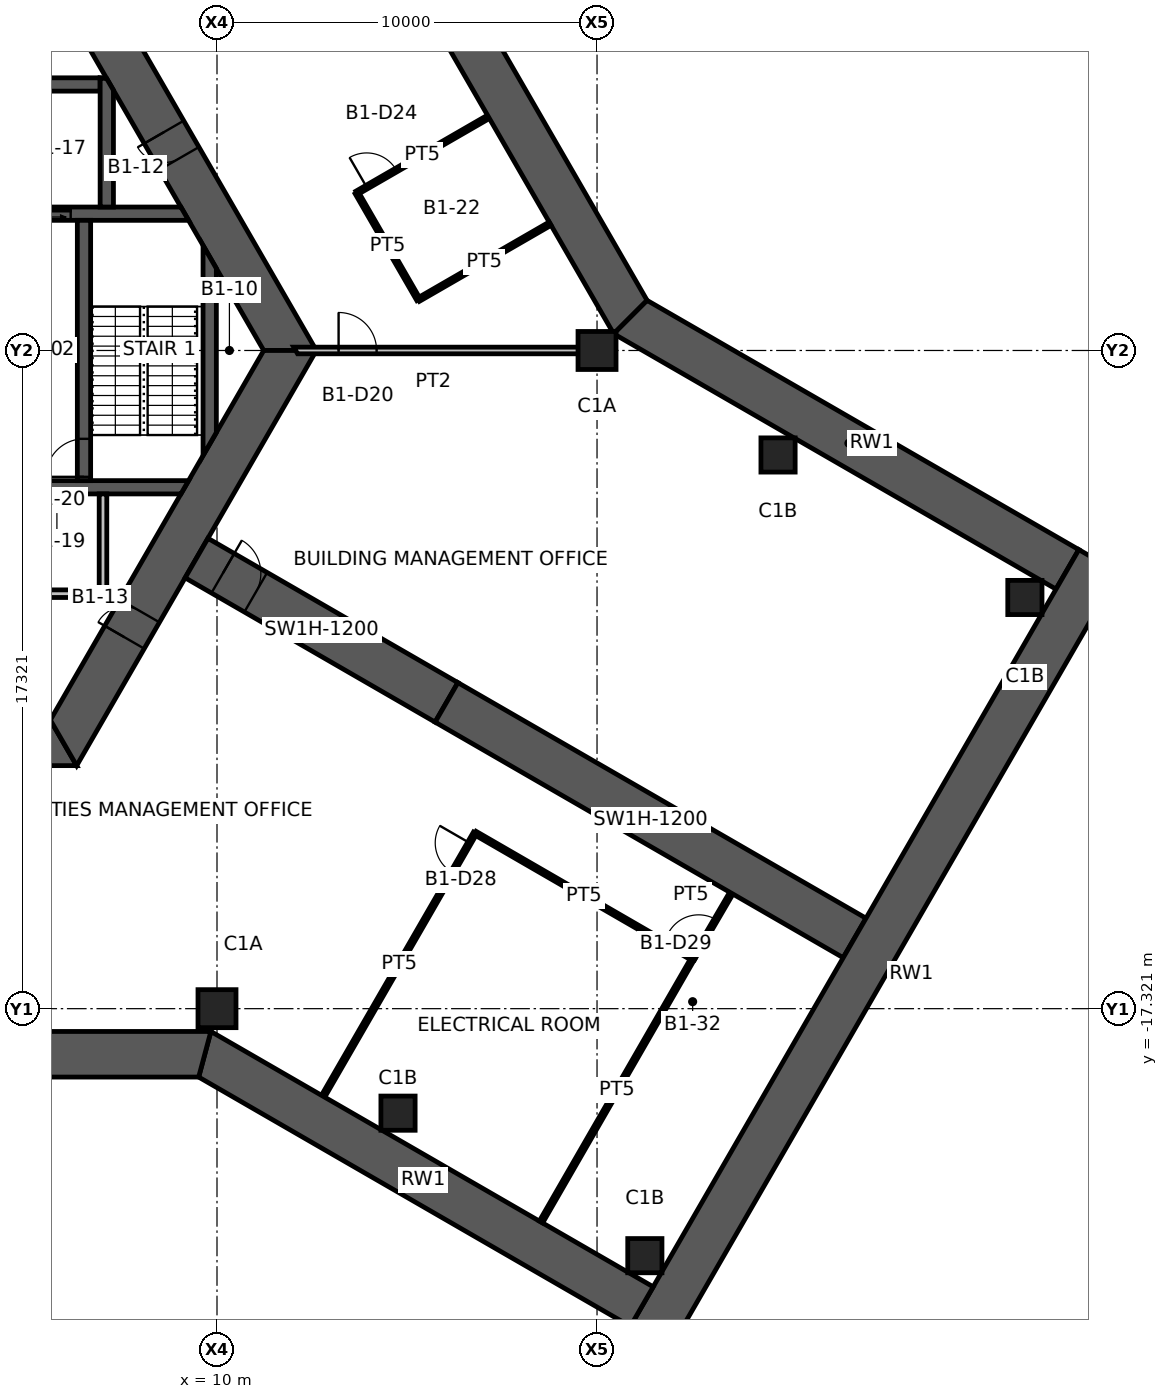
"""IFC4 building model, lengths in metres.
Left out: names, types, materials, properties, quantities, classifications, styles, units other than length and angle.
Written with IfcOpenShell. Run it as: python <this file> out.ifc"""

import sys

from ifc_helpers import new_model, si_unit, direction, frame, frame_2d, origin, origin_2d, place, context, subcontext, project, spatial, polyline, rectangle, hollow_rectangle, outline, extrude, element, fill, save


model = new_model("IFC4")
c1 = context("Model", 3, precision=1e-05, world=origin(), true_north=direction((0.0, 1.0)))
c2 = subcontext(c1, "Body", "Model", "MODEL_VIEW")
j1 = project(units=[si_unit("LENGTHUNIT", "METRE"), si_unit("PLANEANGLEUNIT", "RADIAN")], contexts=[c1])
p1 = place(None, origin())
s1 = spatial("IfcSite", under=j1, at=p1, CompositionType="ELEMENT")
p2 = place(p1, origin())
s2 = spatial("IfcBuilding", under=s1, at=p2, CompositionType="ELEMENT")
p3 = place(p2, frame((0.0, 0.0, -5.0)))
s3 = spatial("IfcBuildingStorey", under=s2, at=p3, CompositionType="ELEMENT", Elevation=-5.0)
for number, where, z_axis, x_axis in (
    (1, (20.0, 0.0, 0.0), (0.0, 0.0, 1.0), (1.0, 0.0, 0.0)),
    (2, (10.0, -17.321, 0.0), (0.0, 0.0, 1.0), (1.0, 0.0, 0.0)),
):
    element("IfcColumn", number, at=place(p3, frame(where, z_axis=z_axis, x_axis=x_axis)), inside=s3, PredefinedType="COLUMN", context=c2, shape_type="SweptSolid", body=[
        extrude(hollow_rectangle(XDim=1.0, YDim=1.0, WallThickness=0.06, at=origin_2d()), origin(), (0.0, 0.0, 1.0), 5.0),
    ])
for number, where, z_axis, x_axis in (
    (3, (14.763, -20.071, 0.0), (0.0, 0.0, 1.0), (1.0, 0.0, 0.0)),
    (4, (21.258, -23.821, 0.0), (0.0, 0.0, 1.0), (1.0, 0.0, 0.0)),
    (5, (24.763, -2.75, 0.0), (0.0, 0.0, 1.0), (1.0, 0.0, 0.0)),
    (6, (31.258, -6.5, 0.0), (0.0, 0.0, 1.0), (1.0, 0.0, 0.0)),
):
    element("IfcColumn", number, at=place(p3, frame(where, z_axis=z_axis, x_axis=x_axis)), inside=s3, PredefinedType="COLUMN", context=c2, shape_type="SweptSolid", body=[
        extrude(hollow_rectangle(XDim=0.9, YDim=0.9, WallThickness=0.05, at=origin_2d()), origin(), (0.0, 0.0, 1.0), 5.0),
    ])
p4 = place(p3, frame((11.922, 0.0, 0.0), z_axis=(0.0, 0.0, 1.0), x_axis=(-0.500004296715, 0.866022923061, 0.0)))
e7 = element("IfcWall", 7, at=p4, inside=s3, PredefinedType="SHEAR", context=c2, shape_type="SweptSolid", body=[
    extrude(outline(polyline([(-0.346, -0.6), (5.835, -0.6), (6.635, -0.6), (12.269, -0.6), (11.576, 0.6), (6.635, 0.6), (5.835, 0.6), (0.346, 0.6), (-0.346, -0.6)])), origin(), (0.0, 0.0, 1.0), 5.0),
])
p5 = place(p4, frame((5.835, 0.0, 0.0)))
e8 = element("IfcOpeningElement", 8, at=p5, cuts=e7, PredefinedType="OPENING", context=c2, shape_type="SweptSolid", body=[
    extrude(rectangle(XDim=0.8, YDim=2.1, at=frame_2d((0.4, 1.05))), frame((0.0, 0.61, 0.0), z_axis=(0.0, -1.0, 0.0), x_axis=(1.0, 0.0, 0.0)), (0.0, 0.0, 1.0), 1.22),
])
p6 = place(p3, frame((-5.961, -10.325, 0.0), z_axis=(0.0, 0.0, 1.0), x_axis=(1.0, 0.0, 0.0)))
e9 = element("IfcWall", 9, at=p6, inside=s3, PredefinedType="SHEAR", context=c2, shape_type="SweptSolid", body=[
    extrude(outline(polyline([(-0.346, -0.6), (5.461, -0.6), (6.461, -0.6), (12.269, -0.6), (11.576, 0.6), (6.461, 0.6), (5.461, 0.6), (0.346, 0.6), (-0.346, -0.6)])), origin(), (0.0, 0.0, 1.0), 5.0),
])
p7 = place(p6, frame((5.461, 0.0, 0.0)))
e10 = element("IfcOpeningElement", 10, at=p7, cuts=e9, PredefinedType="OPENING", context=c2, shape_type="SweptSolid", body=[
    extrude(rectangle(XDim=1.0, YDim=2.1, at=frame_2d((0.5, 1.05))), frame((0.0, 0.61, 0.0), z_axis=(0.0, -1.0, 0.0), x_axis=(1.0, 0.0, 0.0)), (0.0, 0.0, 1.0), 1.22),
])
p8 = place(p3, frame((5.961, -10.325, 0.0), z_axis=(0.0, 0.0, 1.0), x_axis=(0.500004296715, 0.866022923061, 0.0)))
e11 = element("IfcWall", 11, at=p8, inside=s3, PredefinedType="SHEAR", context=c2, shape_type="SweptSolid", body=[
    extrude(outline(polyline([(-0.346, -0.6), (3.208, -0.6), (4.009, -0.6), (12.269, -0.6), (11.576, 0.6), (4.009, 0.6), (3.208, 0.6), (0.346, 0.6), (-0.346, -0.6)])), origin(), (0.0, 0.0, 1.0), 5.0),
])
p9 = place(p8, frame((3.208, 0.0, 0.0)))
e12 = element("IfcOpeningElement", 12, at=p9, cuts=e11, PredefinedType="OPENING", context=c2, shape_type="SweptSolid", body=[
    extrude(rectangle(XDim=0.8, YDim=2.1, at=frame_2d((0.4, 1.05))), frame((0.0, 0.61, 0.0), z_axis=(0.0, -1.0, 0.0), x_axis=(1.0, 0.0, 0.0)), (0.0, 0.0, 1.0), 1.22),
])
p10 = place(p3, frame((9.461, -5.462, 0.0), z_axis=(0.0, 0.0, 1.0), x_axis=(0.866019116917, -0.500010889016, 0.0)))
e13 = element("IfcWall", 13, at=p10, inside=s3, PredefinedType="SHEAR", context=c2, shape_type="SweptSolid", body=[
    extrude(rectangle(XDim=7.595, YDim=1.2, at=frame_2d((3.798, 0.0))), origin(), (0.0, 0.0, 1.0), 5.0),
])
p11 = place(p10, frame((0.8, 0.0, 0.0)))
e14 = element("IfcOpeningElement", 14, at=p11, cuts=e13, PredefinedType="OPENING", context=c2, shape_type="SweptSolid", body=[
    extrude(rectangle(XDim=1.0, YDim=2.1, at=frame_2d((0.5, 1.05))), frame((0.0, 0.61, 0.0), z_axis=(0.0, -1.0, 0.0), x_axis=(1.0, 0.0, 0.0)), (0.0, 0.0, 1.0), 1.22),
])
p12 = place(p3, frame((16.039, -9.26, 0.0), z_axis=(0.0, 0.0, 1.0), x_axis=(0.866023285932, -0.50000366821, 0.0)))
e15 = element("IfcWall", 15, at=p12, inside=s3, PredefinedType="SHEAR", context=c2, shape_type="SweptSolid", body=[
    extrude(rectangle(XDim=12.4, YDim=1.2, at=frame_2d((6.2, 0.0))), origin(), (0.0, 0.0, 1.0), 5.0),
])
p13 = place(p3, frame((11.2, 17.642, 0.0), z_axis=(0.0, 0.0, 1.0), x_axis=(0.499998307868, -0.866026380735, 0.0)))
e16 = element("IfcWall", 16, at=p13, inside=s3, PredefinedType="SOLIDWALL", context=c2, shape_type="SweptSolid", body=[
    extrude(outline(polyline([(-0.161, -0.6), (19.518, -0.6), (19.196, 0.6), (0.161, 0.6), (-0.161, -0.6)])), origin(), (0.0, 0.0, 1.0), 5.0),
])
p14 = place(p3, frame((20.878, 0.878, 0.0), z_axis=(0.0, 0.0, 1.0), x_axis=(0.866028209229, -0.499995140796, 0.0)))
e17 = element("IfcWall", 17, at=p14, inside=s3, PredefinedType="SOLIDWALL", context=c2, shape_type="SweptSolid", body=[
    extrude(outline(polyline([(-0.161, -0.6), (13.279, -0.6), (13.279, 0.6), (0.161, 0.6), (-0.161, -0.6)])), origin(), (0.0, 0.0, 1.0), 5.0),
])
p15 = place(p3, frame((33.198, -5.541, 0.0), z_axis=(0.0, 0.0, 1.0), x_axis=(-0.500005427746, -0.866022270051, 0.0)))
e18 = element("IfcWall", 18, at=p15, inside=s3, PredefinedType="SOLIDWALL", context=c2, shape_type="SweptSolid", body=[
    extrude(rectangle(XDim=23.6, YDim=1.2, at=frame_2d((11.8, 0.0))), origin(), (0.0, 0.0, 1.0), 5.0),
])
p16 = place(p3, frame((21.178, -25.16, 0.0), z_axis=(0.0, 0.0, 1.0), x_axis=(-0.866028209229, 0.499995140796, 0.0)))
e19 = element("IfcWall", 19, at=p16, inside=s3, PredefinedType="SOLIDWALL", context=c2, shape_type="SweptSolid", body=[
    extrude(outline(polyline([(0.0, -0.6), (13.439, -0.6), (13.118, 0.6), (0.0, 0.6), (0.0, -0.6)])), origin(), (0.0, 0.0, 1.0), 5.0),
])
p17 = place(p3, frame((9.678, -18.521, 0.0), z_axis=(0.0, 0.0, 1.0), x_axis=(-1.0, 0.0, 0.0)))
e20 = element("IfcWall", 20, at=p17, inside=s3, PredefinedType="SOLIDWALL", context=c2, shape_type="SweptSolid", body=[
    extrude(outline(polyline([(-0.161, -0.6), (19.518, -0.6), (19.196, 0.6), (0.161, 0.6), (-0.161, -0.6)])), origin(), (0.0, 0.0, 1.0), 5.0),
])
p18 = place(p3, frame((1.425, 3.6, 0.0), z_axis=(0.0, 0.0, 1.0), x_axis=(1.0, 0.0, 0.0)))
e21 = element("IfcWall", 21, at=p18, inside=s3, PredefinedType="SHEAR", context=c2, shape_type="SweptSolid", body=[
    extrude(outline(polyline([(0.0, -0.175), (3.425, -0.175), (4.725, -0.175), (7.827, -0.175), (7.625, 0.175), (4.725, 0.175), (3.425, 0.175), (0.0, 0.175), (0.0, -0.175)])), origin(), (0.0, 0.0, 1.0), 5.0),
])
p19 = place(p18, frame((3.425, 0.0, 0.0)))
e22 = element("IfcOpeningElement", 22, at=p19, cuts=e21, PredefinedType="OPENING", context=c2, shape_type="SweptSolid", body=[
    extrude(rectangle(XDim=1.3, YDim=2.1, at=frame_2d((0.65, 1.05))), frame((0.0, 0.185, 0.0), z_axis=(0.0, -1.0, 0.0), x_axis=(1.0, 0.0, 0.0)), (0.0, 0.0, 1.0), 0.37),
])
p20 = place(p3, frame((1.425, -3.6, 0.0), z_axis=(0.0, 0.0, 1.0), x_axis=(1.0, 0.0, 0.0)))
e23 = element("IfcWall", 23, at=p20, inside=s3, PredefinedType="SHEAR", context=c2, shape_type="SweptSolid", body=[
    extrude(outline(polyline([(0.0, -0.175), (1.125, -0.175), (2.125, -0.175), (7.625, -0.175), (7.827, 0.175), (2.125, 0.175), (1.125, 0.175), (0.0, 0.175), (0.0, -0.175)])), origin(), (0.0, 0.0, 1.0), 5.0),
])
p21 = place(p20, frame((1.125, 0.0, 0.0)))
e24 = element("IfcOpeningElement", 24, at=p21, cuts=e23, PredefinedType="OPENING", context=c2, shape_type="SweptSolid", body=[
    extrude(rectangle(XDim=1.0, YDim=2.1, at=frame_2d((0.5, 1.05))), frame((0.0, 0.185, 0.0), z_axis=(0.0, -1.0, 0.0), x_axis=(1.0, 0.0, 0.0)), (0.0, 0.0, 1.0), 0.37),
])
p22 = place(p3, frame((6.5, -3.425, 0.0), z_axis=(0.0, 0.0, 1.0), x_axis=(0.0, 1.0, 0.0)))
e25 = element("IfcWall", 25, at=p22, inside=s3, PredefinedType="SHEAR", context=c2, shape_type="SweptSolid", body=[
    extrude(rectangle(XDim=6.85, YDim=0.35, at=frame_2d((3.425, 0.0))), origin(), (0.0, 0.0, 1.0), 5.0),
])
p23 = place(p22, frame((0.1, 0.0, 0.0)))
e26 = element("IfcOpeningElement", 26, at=p23, cuts=e25, PredefinedType="OPENING", context=c2, shape_type="SweptSolid", body=[
    extrude(rectangle(XDim=1.0, YDim=2.1, at=frame_2d((0.5, 1.05))), frame((0.0, 0.185, 0.0), z_axis=(0.0, -1.0, 0.0), x_axis=(1.0, 0.0, 0.0)), (0.0, 0.0, 1.0), 0.37),
])
p24 = place(p3, frame((4.675, 7.0, 0.0), z_axis=(0.0, 0.0, 1.0), x_axis=(1.0, 0.0, 0.0)))
e27 = element("IfcWall", 27, at=p24, inside=s3, PredefinedType="SHEAR", context=c2, shape_type="SweptSolid", body=[
    extrude(rectangle(XDim=2.25, YDim=0.35, at=frame_2d((1.125, 0.0))), origin(), (0.0, 0.0, 1.0), 5.0),
])
p25 = place(p3, frame((7.1, 3.775, 0.0), z_axis=(0.0, 0.0, 1.0), x_axis=(0.0, 1.0, 0.0)))
e28 = element("IfcWall", 28, at=p25, inside=s3, PredefinedType="SHEAR", context=c2, shape_type="SweptSolid", body=[
    extrude(outline(polyline([(0.0, -0.175), (3.074, -0.175), (3.377, 0.0), (3.4, 0.175), (0.0, 0.175), (0.0, -0.175)])), origin(), (0.0, 0.0, 1.0), 5.0),
])
p26 = place(p3, frame((9.808, -2.462, 0.0), z_axis=(0.0, 0.0, 1.0), x_axis=(0.0, 1.0, 0.0)))
e29 = element("IfcWall", 29, at=p26, inside=s3, PredefinedType="SHEAR", context=c2, shape_type="SweptSolid", body=[
    extrude(outline(polyline([(0.303, -0.175), (4.621, -0.175), (5.228, 0.175), (-0.303, 0.175), (0.303, -0.175)])), origin(), (0.0, 0.0, 1.0), 5.0),
])
p27 = place(p3, frame((4.675, -6.4, 0.0), z_axis=(0.0, 0.0, 1.0), x_axis=(1.0, 0.0, 0.0)))
e30 = element("IfcWall", 30, at=p27, inside=s3, PredefinedType="STANDARD", context=c2, shape_type="SweptSolid", body=[
    extrude(rectangle(XDim=2.425, YDim=0.2, at=frame_2d((1.212, 0.0))), origin(), (0.0, 0.0, 1.0), 5.0),
])
p28 = place(p3, frame((7.0, -3.775, 0.0), z_axis=(0.0, 0.0, 1.0), x_axis=(0.0, -1.0, 0.0)))
e31 = element("IfcWall", 31, at=p28, inside=s3, PredefinedType="STANDARD", context=c2, shape_type="SweptSolid", body=[
    extrude(rectangle(XDim=2.525, YDim=0.2, at=frame_2d((1.263, 0.0))), origin(), (0.0, 0.0, 1.0), 5.0),
])
p29 = place(p3, frame((12.07, 0.0, 0.0), z_axis=(0.0, 0.0, 1.0), x_axis=(1.0, 0.0, 0.0)))
e32 = element("IfcWall", 32, at=p29, inside=s3, PredefinedType="PARTITIONING", context=c2, shape_type="SweptSolid", body=[
    extrude(outline(polyline([(0.051, -0.087), (1.129, -0.087), (2.129, -0.087), (7.93, -0.087), (7.93, 0.087), (2.129, 0.087), (1.129, 0.087), (-0.051, 0.087), (0.051, -0.087)])), origin(), (0.0, 0.0, 1.0), 3.8),
])
p30 = place(p29, frame((1.129, 0.0, 0.0)))
e33 = element("IfcOpeningElement", 33, at=p30, cuts=e32, PredefinedType="OPENING", context=c2, shape_type="SweptSolid", body=[
    extrude(rectangle(XDim=1.0, YDim=2.1, at=frame_2d((0.5, 1.05))), frame((0.0, 0.098, 0.0), z_axis=(0.0, -1.0, 0.0), x_axis=(1.0, 0.0, 0.0)), (0.0, 0.0, 1.0), 0.195),
])
p31 = place(p3, frame((13.679, 4.149, 0.0), z_axis=(0.0, 0.0, 1.0), x_axis=(0.86599966765, 0.500044573643, 0.0)))
e34 = element("IfcWall", 34, at=p31, inside=s3, PredefinedType="PARTITIONING", context=c2, shape_type="SweptSolid", body=[
    extrude(rectangle(XDim=3.98, YDim=0.1, at=frame_2d((1.99, 0.0))), origin(), (0.0, 0.0, 1.0), 3.7),
])
p32 = place(p31, frame((0.3, 0.0, 0.0)))
e35 = element("IfcOpeningElement", 35, at=p32, cuts=e34, PredefinedType="OPENING", context=c2, shape_type="SweptSolid", body=[
    extrude(rectangle(XDim=0.9, YDim=2.1, at=frame_2d((0.45, 1.05))), frame((0.0, 0.06, 0.0), z_axis=(0.0, -1.0, 0.0), x_axis=(1.0, 0.0, 0.0)), (0.0, 0.0, 1.0), 0.12),
])
p33 = place(p3, frame((15.302, 1.337, 0.0), z_axis=(0.0, 0.0, 1.0), x_axis=(-0.500045780129, 0.865998971001, 0.0)))
e36 = element("IfcWall", 36, at=p33, inside=s3, PredefinedType="PARTITIONING", context=c2, shape_type="SweptSolid", body=[
    extrude(rectangle(XDim=3.246, YDim=0.1, at=frame_2d((1.623, 0.0))), origin(), (0.0, 0.0, 1.0), 3.7),
])
p34 = place(p3, frame((18.765, 3.337, 0.0), z_axis=(0.0, 0.0, 1.0), x_axis=(-0.866017831539, -0.500013115284, 0.0)))
e37 = element("IfcWall", 37, at=p34, inside=s3, PredefinedType="PARTITIONING", context=c2, shape_type="SweptSolid", body=[
    extrude(rectangle(XDim=3.999, YDim=0.1, at=frame_2d((2.0, 0.0))), origin(), (0.0, 0.0, 1.0), 3.7),
])
p35 = place(p3, frame((22.52, -16.004, 0.0), z_axis=(0.0, 0.0, 1.0), x_axis=(-0.499396497017, -0.866373556133, 0.0)))
e38 = element("IfcWall", 38, at=p35, inside=s3, PredefinedType="PARTITIONING", context=c2, shape_type="SweptSolid", body=[
    extrude(rectangle(XDim=7.998, YDim=0.1, at=frame_2d((3.999, 0.0))), origin(), (0.0, 0.0, 1.0), 3.7),
])
p36 = place(p3, frame((12.802, -19.608, 0.0), z_axis=(0.0, 0.0, 1.0), x_axis=(0.499998759335, 0.866026120082, 0.0)))
e39 = element("IfcWall", 39, at=p36, inside=s3, PredefinedType="PARTITIONING", context=c2, shape_type="SweptSolid", body=[
    extrude(rectangle(XDim=7.98, YDim=0.1, at=frame_2d((3.99, 0.0))), origin(), (0.0, 0.0, 1.0), 3.7),
])
p37 = place(p36, frame((6.78, 0.0, 0.0)))
e40 = element("IfcOpeningElement", 40, at=p37, cuts=e39, PredefinedType="OPENING", context=c2, shape_type="SweptSolid", body=[
    extrude(rectangle(XDim=0.9, YDim=2.1, at=frame_2d((0.45, 1.05))), frame((0.0, 0.06, 0.0), z_axis=(0.0, -1.0, 0.0), x_axis=(1.0, 0.0, 0.0)), (0.0, 0.0, 1.0), 0.12),
])
p38 = place(p3, frame((16.792, -12.697, 0.0), z_axis=(0.0, 0.0, 1.0), x_axis=(0.865724093718, -0.500521521571, 0.0)))
e41 = element("IfcWall", 41, at=p38, inside=s3, PredefinedType="PARTITIONING", context=c2, shape_type="SweptSolid", body=[
    extrude(rectangle(XDim=6.62, YDim=0.1, at=frame_2d((3.31, 0.0))), origin(), (0.0, 0.0, 1.0), 3.7),
])
p39 = place(p3, frame((22.522, -16.01, 0.0), z_axis=(0.0, 0.0, 1.0), x_axis=(0.504490591108, 0.863417189708, 0.0)))
e42 = element("IfcWall", 42, at=p39, inside=s3, PredefinedType="PARTITIONING", context=c2, shape_type="SweptSolid", body=[
    extrude(rectangle(XDim=1.984, YDim=0.1, at=frame_2d((0.992, 0.0))), origin(), (0.0, 0.0, 1.0), 3.7),
])
p40 = place(p39, frame((0.3, 0.0, 0.0)))
e43 = element("IfcOpeningElement", 43, at=p40, cuts=e42, PredefinedType="OPENING", context=c2, shape_type="SweptSolid", body=[
    extrude(rectangle(XDim=0.9, YDim=2.1, at=frame_2d((0.45, 1.05))), frame((0.0, 0.06, 0.0), z_axis=(0.0, -1.0, 0.0), x_axis=(1.0, 0.0, 0.0)), (0.0, 0.0, 1.0), 0.12),
])
p41 = place(p5, origin())
e44 = element("IfcDoor", 44, at=p41, inside=s3, OperationType="SINGLE_SWING_RIGHT", PredefinedType="DOOR", context=c2, shape_type="SweptSolid", body=[
    extrude(rectangle(XDim=0.8, YDim=2.1, at=frame_2d((0.4, 1.05))), frame((0.0, 0.025, 0.0), z_axis=(0.0, -1.0, 0.0), x_axis=(1.0, 0.0, 0.0)), (0.0, 0.0, 1.0), 0.05),
])
fill(e8, e44)
p42 = place(p9, origin())
e45 = element("IfcDoor", 45, at=p42, inside=s3, OperationType="SINGLE_SWING_LEFT", PredefinedType="DOOR", context=c2, shape_type="SweptSolid", body=[
    extrude(rectangle(XDim=0.8, YDim=2.1, at=frame_2d((0.4, 1.05))), frame((0.0, 0.025, 0.0), z_axis=(0.0, -1.0, 0.0), x_axis=(1.0, 0.0, 0.0)), (0.0, 0.0, 1.0), 0.05),
])
fill(e12, e45)
p43 = place(p23, origin())
e46 = element("IfcDoor", 46, at=p43, inside=s3, OperationType="SINGLE_SWING_LEFT", PredefinedType="DOOR", context=c2, shape_type="SweptSolid", body=[
    extrude(rectangle(XDim=1.0, YDim=2.1, at=frame_2d((0.5, 1.05))), frame((0.0, 0.025, 0.0), z_axis=(0.0, -1.0, 0.0), x_axis=(1.0, 0.0, 0.0)), (0.0, 0.0, 1.0), 0.05),
])
fill(e26, e46)
p44 = place(p11, origin())
e47 = element("IfcDoor", 47, at=p44, inside=s3, OperationType="SINGLE_SWING_LEFT", PredefinedType="DOOR", context=c2, shape_type="SweptSolid", body=[
    extrude(rectangle(XDim=1.0, YDim=2.1, at=frame_2d((0.5, 1.05))), frame((0.0, 0.025, 0.0), z_axis=(0.0, -1.0, 0.0), x_axis=(1.0, 0.0, 0.0)), (0.0, 0.0, 1.0), 0.05),
])
fill(e14, e47)
p45 = place(p30, origin())
e48 = element("IfcDoor", 48, at=p45, inside=s3, OperationType="SINGLE_SWING_LEFT", PredefinedType="DOOR", context=c2, shape_type="SweptSolid", body=[
    extrude(rectangle(XDim=1.0, YDim=2.1, at=frame_2d((0.5, 1.05))), frame((0.0, 0.025, 0.0), z_axis=(0.0, -1.0, 0.0), x_axis=(1.0, 0.0, 0.0)), (0.0, 0.0, 1.0), 0.05),
])
fill(e33, e48)
p46 = place(p32, origin())
e49 = element("IfcDoor", 49, at=p46, inside=s3, OperationType="SINGLE_SWING_LEFT", PredefinedType="DOOR", context=c2, shape_type="SweptSolid", body=[
    extrude(rectangle(XDim=0.9, YDim=2.1, at=frame_2d((0.45, 1.05))), frame((0.0, 0.025, 0.0), z_axis=(0.0, -1.0, 0.0), x_axis=(1.0, 0.0, 0.0)), (0.0, 0.0, 1.0), 0.05),
])
fill(e35, e49)
p47 = place(p37, origin())
e50 = element("IfcDoor", 50, at=p47, inside=s3, OperationType="SINGLE_SWING_RIGHT", PredefinedType="DOOR", context=c2, shape_type="SweptSolid", body=[
    extrude(rectangle(XDim=0.9, YDim=2.1, at=frame_2d((0.45, 1.05))), frame((0.0, 0.025, 0.0), z_axis=(0.0, -1.0, 0.0), x_axis=(1.0, 0.0, 0.0)), (0.0, 0.0, 1.0), 0.05),
])
fill(e40, e50)
p48 = place(p40, origin())
e51 = element("IfcDoor", 51, at=p48, inside=s3, OperationType="SINGLE_SWING_LEFT", PredefinedType="DOOR", context=c2, shape_type="SweptSolid", body=[
    extrude(rectangle(XDim=0.9, YDim=2.1, at=frame_2d((0.45, 1.05))), frame((0.0, 0.025, 0.0), z_axis=(0.0, -1.0, 0.0), x_axis=(1.0, 0.0, 0.0)), (0.0, 0.0, 1.0), 0.05),
])
fill(e43, e51)
p49 = place(p19, origin())
e52 = element("IfcDoor", 52, at=p49, inside=s3, OperationType="DOUBLE_DOOR_SLIDING", PredefinedType="DOOR", context=c2, shape_type="SweptSolid", body=[
    extrude(rectangle(XDim=1.3, YDim=2.1, at=frame_2d((0.65, 1.05))), frame((0.0, 0.025, 0.0), z_axis=(0.0, -1.0, 0.0), x_axis=(1.0, 0.0, 0.0)), (0.0, 0.0, 1.0), 0.05),
])
fill(e22, e52)
save(model, sys.argv[1])
